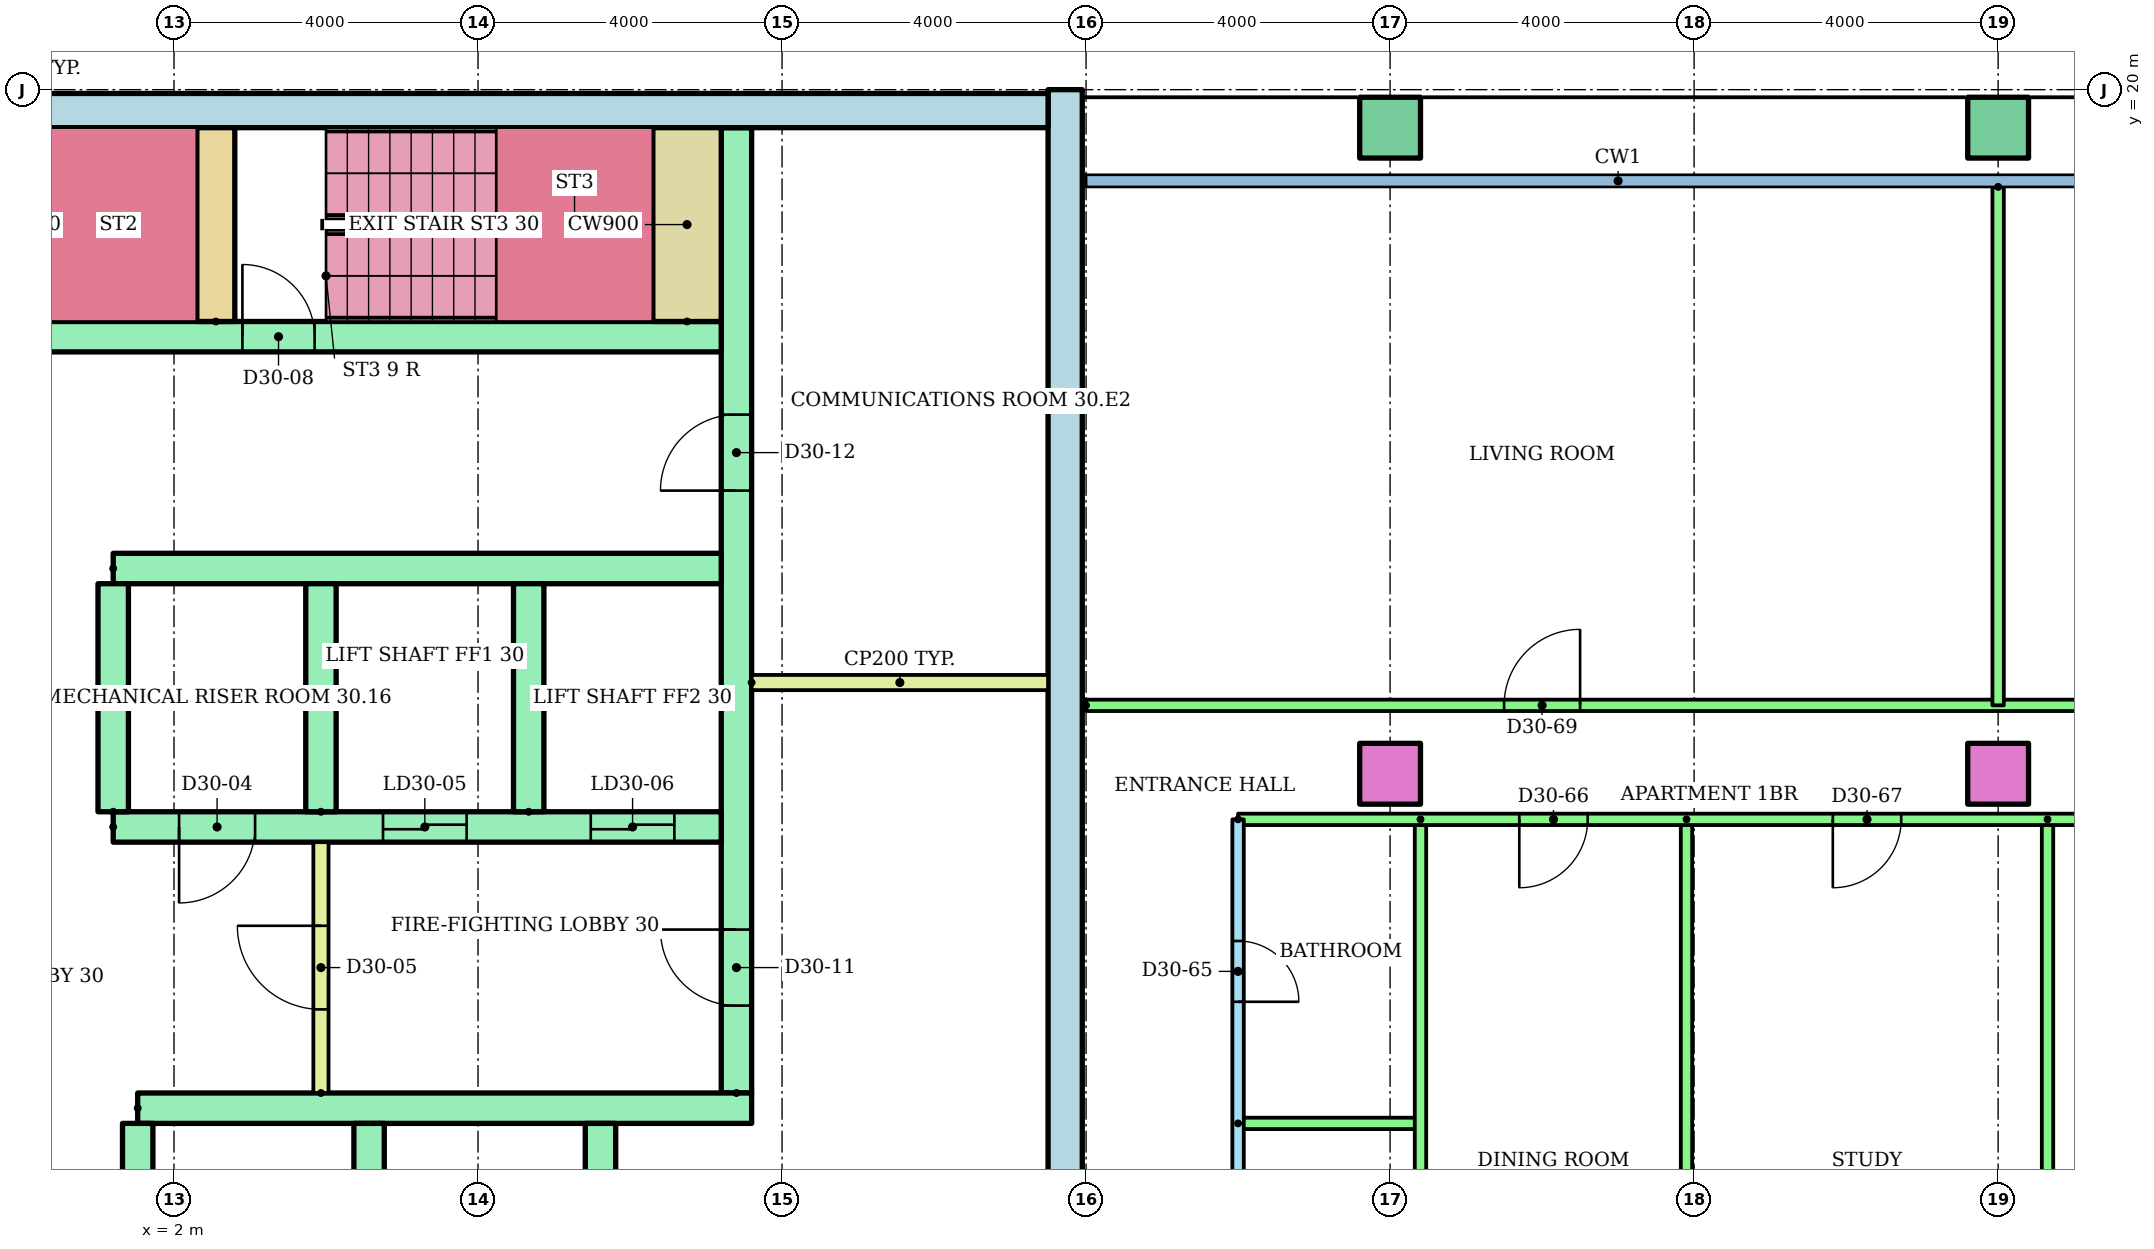
"""IFC4 building model, lengths in metres.
Left out: names, types, materials, properties, quantities, classifications, styles, units other than length and angle.
Written with IfcOpenShell. Run it as: python <this file> out.ifc"""

import sys

from ifc_helpers import new_model, si_unit, direction, frame, frame_2d, origin, origin_2d, place, context, subcontext, project, spatial, rectangle, hollow_rectangle, extrude, element, fill, save


model = new_model("IFC4")
c1 = context("Model", 3, precision=1e-05, world=origin(), true_north=direction((0.0, 1.0)))
c2 = subcontext(c1, "Body", "Model", "MODEL_VIEW")
j1 = project(units=[si_unit("LENGTHUNIT", "METRE"), si_unit("PLANEANGLEUNIT", "RADIAN")], contexts=[c1])
p1 = place(None, origin())
s1 = spatial("IfcSite", under=j1, at=p1, CompositionType="ELEMENT")
p2 = place(p1, origin())
s2 = spatial("IfcBuilding", under=s1, at=p2, CompositionType="ELEMENT")
p3 = place(p2, frame((0.0, 0.0, 119.8)))
s3 = spatial("IfcBuildingStorey", under=s2, at=p3, CompositionType="ELEMENT", Elevation=119.8)
for number, where in (
    (1, (18.0, 11.0, 0.0)),
    (2, (26.0, 11.0, 0.0)),
):
    element("IfcColumn", number, at=place(p3, frame(where)), inside=s3, PredefinedType="COLUMN", context=c2, shape_type="SweptSolid", body=[
        extrude(rectangle(XDim=0.8, YDim=0.8, at=origin_2d()), origin(), (0.0, 0.0, 1.0), 3.2),
    ])
for number, where in (
    (3, (18.0, 19.5, 0.0)),
    (4, (26.0, 19.5, 0.0)),
):
    element("IfcColumn", number, at=place(p3, frame(where)), inside=s3, PredefinedType="COLUMN", context=c2, shape_type="SweptSolid", body=[
        extrude(hollow_rectangle(XDim=0.8, YDim=0.8, WallThickness=0.04, at=origin_2d()), origin(), (0.0, 0.0, 1.0), 3.2),
    ])
p4 = place(p3, frame((13.725, 3.0, 0.0), z_axis=(0.0, 0.0, 1.0), x_axis=(0.0, 1.0, 0.0)))
e5 = element("IfcWall", 5, at=p4, inside=s3, PredefinedType="SHEAR", context=c2, shape_type="SweptSolid", body=[
    extrude(rectangle(XDim=17.0, YDim=0.45, at=frame_2d((8.5, 0.0))), origin(), (0.0, 0.0, 1.0), 2.92),
])
p5 = place(p3, frame((-13.5, 19.725, 0.0)))
e6 = element("IfcWall", 6, at=p5, inside=s3, PredefinedType="SHEAR", context=c2, shape_type="SweptSolid", body=[
    extrude(rectangle(XDim=27.0, YDim=0.45, at=frame_2d((13.5, 0.0))), origin(), (0.0, 0.0, 1.0), 2.92),
])
p6 = place(p3, frame((9.4, 6.8, 0.0), z_axis=(0.0, 0.0, 1.0), x_axis=(0.0, 1.0, 0.0)))
e7 = element("IfcWall", 7, at=p6, inside=s3, PredefinedType="SHEAR", context=c2, shape_type="SweptSolid", body=[
    extrude(rectangle(XDim=12.7, YDim=0.4, at=frame_2d((6.35, 0.0))), origin(), (0.0, 0.0, 1.0), 2.92),
])
p7 = place(p6, frame((1.15, 0.0, 0.0)))
e8 = element("IfcOpeningElement", 8, at=p7, cuts=e7, PredefinedType="OPENING", context=c2, shape_type="SweptSolid", body=[
    extrude(rectangle(XDim=1.0, YDim=2.1, at=frame_2d((0.5, 1.05))), frame((0.0, 0.21, 0.0), z_axis=(0.0, -1.0, 0.0), x_axis=(1.0, 0.0, 0.0)), (0.0, 0.0, 1.0), 0.42),
])
p8 = place(p6, frame((7.925, 0.0, 0.0)))
e9 = element("IfcOpeningElement", 9, at=p8, cuts=e7, PredefinedType="OPENING", context=c2, shape_type="SweptSolid", body=[
    extrude(rectangle(XDim=1.0, YDim=2.1, at=frame_2d((0.5, 1.05))), frame((0.0, 0.21, 0.0), z_axis=(0.0, -1.0, 0.0), x_axis=(1.0, 0.0, 0.0)), (0.0, 0.0, 1.0), 0.42),
])
p9 = place(p3, frame((1.522, 6.6, 0.0)))
e10 = element("IfcWall", 10, at=p9, inside=s3, PredefinedType="SHEAR", context=c2, shape_type="SweptSolid", body=[
    extrude(rectangle(XDim=8.078, YDim=0.4, at=frame_2d((4.039, 0.0))), origin(), (0.0, 0.0, 1.0), 2.92),
])
for number, where, z_axis, x_axis in (
    (11, (1.522, 3.4, 0.0), (0.0, 0.0, 1.0), (0.0, 1.0, 0.0)),
    (12, (4.567, 3.4, 0.0), (0.0, 0.0, 1.0), (0.0, 1.0, 0.0)),
    (13, (7.611, 3.4, 0.0), (0.0, 0.0, 1.0), (0.0, 1.0, 0.0)),
):
    element("IfcWall", number, at=place(p3, frame(where, z_axis=z_axis, x_axis=x_axis)), inside=s3, PredefinedType="SHEAR", context=c2, shape_type="SweptSolid", body=[
        extrude(rectangle(XDim=3.0, YDim=0.4, at=frame_2d((1.5, 0.0))), origin(), (0.0, 0.0, 1.0), 2.92),
    ])
p10 = place(p3, frame((1.2, 10.3, 0.0)))
e14 = element("IfcWall", 14, at=p10, inside=s3, PredefinedType="SHEAR", context=c2, shape_type="SweptSolid", body=[
    extrude(rectangle(XDim=8.0, YDim=0.4, at=frame_2d((4.0, 0.0))), origin(), (0.0, 0.0, 1.0), 2.92),
])
p11 = place(p10, frame((3.55, 0.0, 0.0)))
e15 = element("IfcOpeningElement", 15, at=p11, cuts=e14, PredefinedType="OPENING", context=c2, shape_type="SweptSolid", body=[
    extrude(rectangle(XDim=1.1, YDim=2.1, at=frame_2d((0.55, 1.05))), frame((0.0, 0.21, 0.0), z_axis=(0.0, -1.0, 0.0), x_axis=(1.0, 0.0, 0.0)), (0.0, 0.0, 1.0), 0.42),
])
p12 = place(p10, frame((6.283, 0.0, 0.0)))
e16 = element("IfcOpeningElement", 16, at=p12, cuts=e14, PredefinedType="OPENING", context=c2, shape_type="SweptSolid", body=[
    extrude(rectangle(XDim=1.1, YDim=2.1, at=frame_2d((0.55, 1.05))), frame((0.0, 0.21, 0.0), z_axis=(0.0, -1.0, 0.0), x_axis=(1.0, 0.0, 0.0)), (0.0, 0.0, 1.0), 0.42),
])
p13 = place(p10, frame((0.867, 0.0, 0.0)))
e17 = element("IfcOpeningElement", 17, at=p13, cuts=e14, PredefinedType="OPENING", context=c2, shape_type="SweptSolid", body=[
    extrude(rectangle(XDim=1.0, YDim=2.1, at=frame_2d((0.5, 1.05))), frame((0.0, 0.21, 0.0), z_axis=(0.0, -1.0, 0.0), x_axis=(1.0, 0.0, 0.0)), (0.0, 0.0, 1.0), 0.42),
])
p14 = place(p3, frame((1.2, 13.7, 0.0)))
e18 = element("IfcWall", 18, at=p14, inside=s3, PredefinedType="SHEAR", context=c2, shape_type="SweptSolid", body=[
    extrude(rectangle(XDim=8.0, YDim=0.4, at=frame_2d((4.0, 0.0))), origin(), (0.0, 0.0, 1.0), 2.92),
])
for number, where, z_axis, x_axis in (
    (19, (1.2, 10.5, 0.0), (0.0, 0.0, 1.0), (0.0, 1.0, 0.0)),
    (20, (3.933, 10.5, 0.0), (0.0, 0.0, 1.0), (0.0, 1.0, 0.0)),
    (21, (6.667, 10.5, 0.0), (0.0, 0.0, 1.0), (0.0, 1.0, 0.0)),
):
    element("IfcWall", number, at=place(p3, frame(where, z_axis=z_axis, x_axis=x_axis)), inside=s3, PredefinedType="SHEAR", context=c2, shape_type="SweptSolid", body=[
        extrude(rectangle(XDim=3.0, YDim=0.4, at=frame_2d((1.5, 0.0))), origin(), (0.0, 0.0, 1.0), 2.92),
    ])
p15 = place(p3, frame((3.933, 6.8, 0.0), z_axis=(0.0, 0.0, 1.0), x_axis=(0.0, 1.0, 0.0)))
e22 = element("IfcWall", 22, at=p15, inside=s3, PredefinedType="PARTITIONING", context=c2, shape_type="SweptSolid", body=[
    extrude(rectangle(XDim=3.3, YDim=0.2, at=frame_2d((1.65, 0.0))), origin(), (0.0, 0.0, 1.0), 2.92),
])
p16 = place(p15, frame((1.1, 0.0, 0.0)))
e23 = element("IfcOpeningElement", 23, at=p16, cuts=e22, PredefinedType="OPENING", context=c2, shape_type="SweptSolid", body=[
    extrude(rectangle(XDim=1.1, YDim=2.1, at=frame_2d((0.55, 1.05))), frame((0.0, 0.11, 0.0), z_axis=(0.0, -1.0, 0.0), x_axis=(1.0, 0.0, 0.0)), (0.0, 0.0, 1.0), 0.22),
])
p17 = place(p3, frame((-9.2, 16.75, 0.0)))
e24 = element("IfcWall", 24, at=p17, inside=s3, PredefinedType="SHEAR", context=c2, shape_type="SweptSolid", body=[
    extrude(rectangle(XDim=18.4, YDim=0.4, at=frame_2d((9.2, 0.0))), origin(), (0.0, 0.0, 1.0), 2.92),
])
p18 = place(p17, frame((0.1, 0.0, 0.0)))
e25 = element("IfcOpeningElement", 25, at=p18, cuts=e24, PredefinedType="OPENING", context=c2, shape_type="SweptSolid", body=[
    extrude(rectangle(XDim=0.95, YDim=2.1, at=frame_2d((0.475, 1.05))), frame((0.0, 0.21, 0.0), z_axis=(0.0, -1.0, 0.0), x_axis=(1.0, 0.0, 0.0)), (0.0, 0.0, 1.0), 0.42),
])
p19 = place(p17, frame((6.1, 0.0, 0.0)))
e26 = element("IfcOpeningElement", 26, at=p19, cuts=e24, PredefinedType="OPENING", context=c2, shape_type="SweptSolid", body=[
    extrude(rectangle(XDim=0.95, YDim=2.1, at=frame_2d((0.475, 1.05))), frame((0.0, 0.21, 0.0), z_axis=(0.0, -1.0, 0.0), x_axis=(1.0, 0.0, 0.0)), (0.0, 0.0, 1.0), 0.42),
])
p20 = place(p17, frame((12.1, 0.0, 0.0)))
e27 = element("IfcOpeningElement", 27, at=p20, cuts=e24, PredefinedType="OPENING", context=c2, shape_type="SweptSolid", body=[
    extrude(rectangle(XDim=0.95, YDim=2.1, at=frame_2d((0.475, 1.05))), frame((0.0, 0.21, 0.0), z_axis=(0.0, -1.0, 0.0), x_axis=(1.0, 0.0, 0.0)), (0.0, 0.0, 1.0), 0.42),
])
p21 = place(p3, frame((2.55, 16.95, 0.0), z_axis=(0.0, 0.0, 1.0), x_axis=(0.0, 1.0, 0.0)))
e28 = element("IfcWall", 28, at=p21, inside=s3, PredefinedType="SHEAR", context=c2, shape_type="SweptSolid", body=[
    extrude(rectangle(XDim=2.55, YDim=0.5, at=frame_2d((1.275, 0.0))), origin(), (0.0, 0.0, 1.0), 2.92),
])
p22 = place(p3, frame((8.75, 16.95, 0.0), z_axis=(0.0, 0.0, 1.0), x_axis=(0.0, 1.0, 0.0)))
e29 = element("IfcWall", 29, at=p22, inside=s3, PredefinedType="SHEAR", context=c2, shape_type="SweptSolid", body=[
    extrude(rectangle(XDim=2.55, YDim=0.9, at=frame_2d((1.275, 0.0))), origin(), (0.0, 0.0, 1.0), 2.92),
])
p23 = place(p3, frame((9.6, 12.2, 0.0)))
e30 = element("IfcWall", 30, at=p23, inside=s3, PredefinedType="PARTITIONING", context=c2, shape_type="SweptSolid", body=[
    extrude(rectangle(XDim=3.9, YDim=0.2, at=frame_2d((1.95, 0.0))), origin(), (0.0, 0.0, 1.0), 2.92),
])
p24 = place(p3, frame((16.0, 10.4, 0.0), z_axis=(0.0, 0.0, 1.0), x_axis=(0.0, -1.0, 0.0)))
e31 = element("IfcWall", 31, at=p24, inside=s3, PredefinedType="PARTITIONING", context=c2, shape_type="SweptSolid", body=[
    extrude(rectangle(XDim=9.0, YDim=0.15, at=frame_2d((4.5, 0.0))), origin(), (0.0, 0.0, 1.0), 2.4),
])
p25 = place(p24, frame((6.05, 0.0, 0.0)))
e32 = element("IfcOpeningElement", 32, at=p25, cuts=e31, PredefinedType="OPENING", context=c2, shape_type="SweptSolid", body=[
    extrude(rectangle(XDim=0.9, YDim=2.1, at=frame_2d((0.45, 1.05))), frame((0.0, 0.085, 0.0), z_axis=(0.0, -1.0, 0.0), x_axis=(1.0, 0.0, 0.0)), (0.0, 0.0, 1.0), 0.17),
])
p26 = place(p24, frame((1.6, 0.0, 0.0)))
e33 = element("IfcOpeningElement", 33, at=p26, cuts=e31, PredefinedType="OPENING", context=c2, shape_type="SweptSolid", body=[
    extrude(rectangle(XDim=0.8, YDim=2.1, at=frame_2d((0.4, 1.05))), frame((0.0, 0.085, 0.0), z_axis=(0.0, -1.0, 0.0), x_axis=(1.0, 0.0, 0.0)), (0.0, 0.0, 1.0), 0.17),
])
p27 = place(p3, frame((16.0, 6.4, 0.0)))
e34 = element("IfcWall", 34, at=p27, inside=s3, PredefinedType="PARTITIONING", context=c2, shape_type="SweptSolid", body=[
    extrude(rectangle(XDim=2.4, YDim=0.15, at=frame_2d((1.2, 0.0))), origin(), (0.0, 0.0, 1.0), 2.4),
])
for number, where, z_axis, x_axis in (
    (35, (18.4, 10.4, 0.0), (0.0, 0.0, 1.0), (0.0, -1.0, 0.0)),
    (36, (21.9, 10.4, 0.0), (0.0, 0.0, 1.0), (0.0, -1.0, 0.0)),
    (37, (26.65, 10.4, 0.0), (0.0, 0.0, 1.0), (0.0, -1.0, 0.0)),
):
    element("IfcWall", number, at=place(p3, frame(where, z_axis=z_axis, x_axis=x_axis)), inside=s3, PredefinedType="PARTITIONING", context=c2, shape_type="SweptSolid", body=[
        extrude(rectangle(XDim=9.0, YDim=0.15, at=frame_2d((4.5, 0.0))), origin(), (0.0, 0.0, 1.0), 2.4),
    ])
p28 = place(p3, frame((32.71, 10.4, 0.0), z_axis=(0.0, 0.0, 1.0), x_axis=(-1.0, 0.0, 0.0)))
e38 = element("IfcWall", 38, at=p28, inside=s3, PredefinedType="PARTITIONING", context=c2, shape_type="SweptSolid", body=[
    extrude(rectangle(XDim=16.71, YDim=0.15, at=frame_2d((8.355, 0.0))), origin(), (0.0, 0.0, 1.0), 2.4),
])
p29 = place(p28, frame((12.11, 0.0, 0.0)))
e39 = element("IfcOpeningElement", 39, at=p29, cuts=e38, PredefinedType="OPENING", context=c2, shape_type="SweptSolid", body=[
    extrude(rectangle(XDim=0.9, YDim=2.1, at=frame_2d((0.45, 1.05))), frame((0.0, 0.085, 0.0), z_axis=(0.0, -1.0, 0.0), x_axis=(1.0, 0.0, 0.0)), (0.0, 0.0, 1.0), 0.17),
])
p30 = place(p28, frame((7.985, 0.0, 0.0)))
e40 = element("IfcOpeningElement", 40, at=p30, cuts=e38, PredefinedType="OPENING", context=c2, shape_type="SweptSolid", body=[
    extrude(rectangle(XDim=0.9, YDim=2.1, at=frame_2d((0.45, 1.05))), frame((0.0, 0.085, 0.0), z_axis=(0.0, -1.0, 0.0), x_axis=(1.0, 0.0, 0.0)), (0.0, 0.0, 1.0), 0.17),
])
p31 = place(p28, frame((2.685, 0.0, 0.0)))
e41 = element("IfcOpeningElement", 41, at=p31, cuts=e38, PredefinedType="OPENING", context=c2, shape_type="SweptSolid", body=[
    extrude(rectangle(XDim=0.9, YDim=2.1, at=frame_2d((0.45, 1.05))), frame((0.0, 0.085, 0.0), z_axis=(0.0, -1.0, 0.0), x_axis=(1.0, 0.0, 0.0)), (0.0, 0.0, 1.0), 0.17),
])
p32 = place(p3, frame((14.0, 11.9, 0.0)))
e42 = element("IfcWall", 42, at=p32, inside=s3, PredefinedType="PARTITIONING", context=c2, shape_type="SweptSolid", body=[
    extrude(rectangle(XDim=18.72, YDim=0.15, at=frame_2d((9.36, 0.0))), origin(), (0.0, 0.0, 1.0), 2.4),
])
p33 = place(p32, frame((5.5, 0.0, 0.0)))
e43 = element("IfcOpeningElement", 43, at=p33, cuts=e42, PredefinedType="OPENING", context=c2, shape_type="SweptSolid", body=[
    extrude(rectangle(XDim=1.0, YDim=2.1, at=frame_2d((0.5, 1.05))), frame((0.0, 0.085, 0.0), z_axis=(0.0, -1.0, 0.0), x_axis=(1.0, 0.0, 0.0)), (0.0, 0.0, 1.0), 0.17),
])
p34 = place(p32, frame((14.8, 0.0, 0.0)))
e44 = element("IfcOpeningElement", 44, at=p34, cuts=e42, PredefinedType="OPENING", context=c2, shape_type="SweptSolid", body=[
    extrude(rectangle(XDim=0.9, YDim=2.1, at=frame_2d((0.45, 1.05))), frame((0.0, 0.085, 0.0), z_axis=(0.0, -1.0, 0.0), x_axis=(1.0, 0.0, 0.0)), (0.0, 0.0, 1.0), 0.17),
])
p35 = place(p3, frame((26.0, 18.721, 0.0), z_axis=(0.0, 0.0, 1.0), x_axis=(0.0, -1.0, 0.0)))
e45 = element("IfcWall", 45, at=p35, inside=s3, PredefinedType="PARTITIONING", context=c2, shape_type="SweptSolid", body=[
    extrude(rectangle(XDim=6.821, YDim=0.15, at=frame_2d((3.411, 0.0))), origin(), (0.0, 0.0, 1.0), 2.4),
])
p36 = place(p11, origin())
e46 = element("IfcDoor", 46, at=p36, inside=s3, OperationType="SLIDING_TO_LEFT", PredefinedType="DOOR", context=c2, shape_type="SweptSolid", body=[
    extrude(rectangle(XDim=1.1, YDim=2.1, at=frame_2d((0.55, 1.05))), frame((0.0, 0.025, 0.0), z_axis=(0.0, -1.0, 0.0), x_axis=(1.0, 0.0, 0.0)), (0.0, 0.0, 1.0), 0.05),
])
fill(e15, e46)
p37 = place(p12, origin())
e47 = element("IfcDoor", 47, at=p37, inside=s3, OperationType="SLIDING_TO_LEFT", PredefinedType="DOOR", context=c2, shape_type="SweptSolid", body=[
    extrude(rectangle(XDim=1.1, YDim=2.1, at=frame_2d((0.55, 1.05))), frame((0.0, 0.025, 0.0), z_axis=(0.0, -1.0, 0.0), x_axis=(1.0, 0.0, 0.0)), (0.0, 0.0, 1.0), 0.05),
])
fill(e16, e47)
p38 = place(p13, frame((1.0, 0.0, 0.0), z_axis=(0.0, 0.0, 1.0), x_axis=(-1.0, 0.0, 0.0)))
e48 = element("IfcDoor", 48, at=p38, inside=s3, OperationType="SINGLE_SWING_LEFT", PredefinedType="DOOR", context=c2, shape_type="SweptSolid", body=[
    extrude(rectangle(XDim=1.0, YDim=2.1, at=frame_2d((0.5, 1.05))), frame((0.0, 0.025, 0.0), z_axis=(0.0, -1.0, 0.0), x_axis=(1.0, 0.0, 0.0)), (0.0, 0.0, 1.0), 0.05),
])
fill(e17, e48)
p39 = place(p16, origin())
e49 = element("IfcDoor", 49, at=p39, inside=s3, OperationType="SINGLE_SWING_RIGHT", PredefinedType="DOOR", context=c2, shape_type="SweptSolid", body=[
    extrude(rectangle(XDim=1.1, YDim=2.1, at=frame_2d((0.55, 1.05))), frame((0.0, 0.025, 0.0), z_axis=(0.0, -1.0, 0.0), x_axis=(1.0, 0.0, 0.0)), (0.0, 0.0, 1.0), 0.05),
])
fill(e23, e49)
p40 = place(p20, origin())
e50 = element("IfcDoor", 50, at=p40, inside=s3, OperationType="SINGLE_SWING_LEFT", PredefinedType="DOOR", context=c2, shape_type="SweptSolid", body=[
    extrude(rectangle(XDim=0.95, YDim=2.1, at=frame_2d((0.475, 1.05))), frame((0.0, 0.025, 0.0), z_axis=(0.0, -1.0, 0.0), x_axis=(1.0, 0.0, 0.0)), (0.0, 0.0, 1.0), 0.05),
])
fill(e27, e50)
p41 = place(p7, origin())
e51 = element("IfcDoor", 51, at=p41, inside=s3, OperationType="SINGLE_SWING_RIGHT", PredefinedType="DOOR", context=c2, shape_type="SweptSolid", body=[
    extrude(rectangle(XDim=1.0, YDim=2.1, at=frame_2d((0.5, 1.05))), frame((0.0, 0.025, 0.0), z_axis=(0.0, -1.0, 0.0), x_axis=(1.0, 0.0, 0.0)), (0.0, 0.0, 1.0), 0.05),
])
fill(e8, e51)
p42 = place(p8, origin())
e52 = element("IfcDoor", 52, at=p42, inside=s3, OperationType="SINGLE_SWING_LEFT", PredefinedType="DOOR", context=c2, shape_type="SweptSolid", body=[
    extrude(rectangle(XDim=1.0, YDim=2.1, at=frame_2d((0.5, 1.05))), frame((0.0, 0.025, 0.0), z_axis=(0.0, -1.0, 0.0), x_axis=(1.0, 0.0, 0.0)), (0.0, 0.0, 1.0), 0.05),
])
fill(e9, e52)
p43 = place(p26, origin())
e53 = element("IfcDoor", 53, at=p43, inside=s3, OperationType="SINGLE_SWING_RIGHT", PredefinedType="DOOR", context=c2, shape_type="SweptSolid", body=[
    extrude(rectangle(XDim=0.8, YDim=2.1, at=frame_2d((0.4, 1.05))), frame((0.0, 0.025, 0.0), z_axis=(0.0, -1.0, 0.0), x_axis=(1.0, 0.0, 0.0)), (0.0, 0.0, 1.0), 0.05),
])
fill(e33, e53)
p44 = place(p29, origin())
e54 = element("IfcDoor", 54, at=p44, inside=s3, OperationType="SINGLE_SWING_RIGHT", PredefinedType="DOOR", context=c2, shape_type="SweptSolid", body=[
    extrude(rectangle(XDim=0.9, YDim=2.1, at=frame_2d((0.45, 1.05))), frame((0.0, 0.025, 0.0), z_axis=(0.0, -1.0, 0.0), x_axis=(1.0, 0.0, 0.0)), (0.0, 0.0, 1.0), 0.05),
])
fill(e39, e54)
p45 = place(p30, origin())
e55 = element("IfcDoor", 55, at=p45, inside=s3, OperationType="SINGLE_SWING_RIGHT", PredefinedType="DOOR", context=c2, shape_type="SweptSolid", body=[
    extrude(rectangle(XDim=0.9, YDim=2.1, at=frame_2d((0.45, 1.05))), frame((0.0, 0.025, 0.0), z_axis=(0.0, -1.0, 0.0), x_axis=(1.0, 0.0, 0.0)), (0.0, 0.0, 1.0), 0.05),
])
fill(e40, e55)
p46 = place(p33, origin())
e56 = element("IfcDoor", 56, at=p46, inside=s3, OperationType="SINGLE_SWING_RIGHT", PredefinedType="DOOR", context=c2, shape_type="SweptSolid", body=[
    extrude(rectangle(XDim=1.0, YDim=2.1, at=frame_2d((0.5, 1.05))), frame((0.0, 0.025, 0.0), z_axis=(0.0, -1.0, 0.0), x_axis=(1.0, 0.0, 0.0)), (0.0, 0.0, 1.0), 0.05),
])
fill(e43, e56)
save(model, sys.argv[1])
